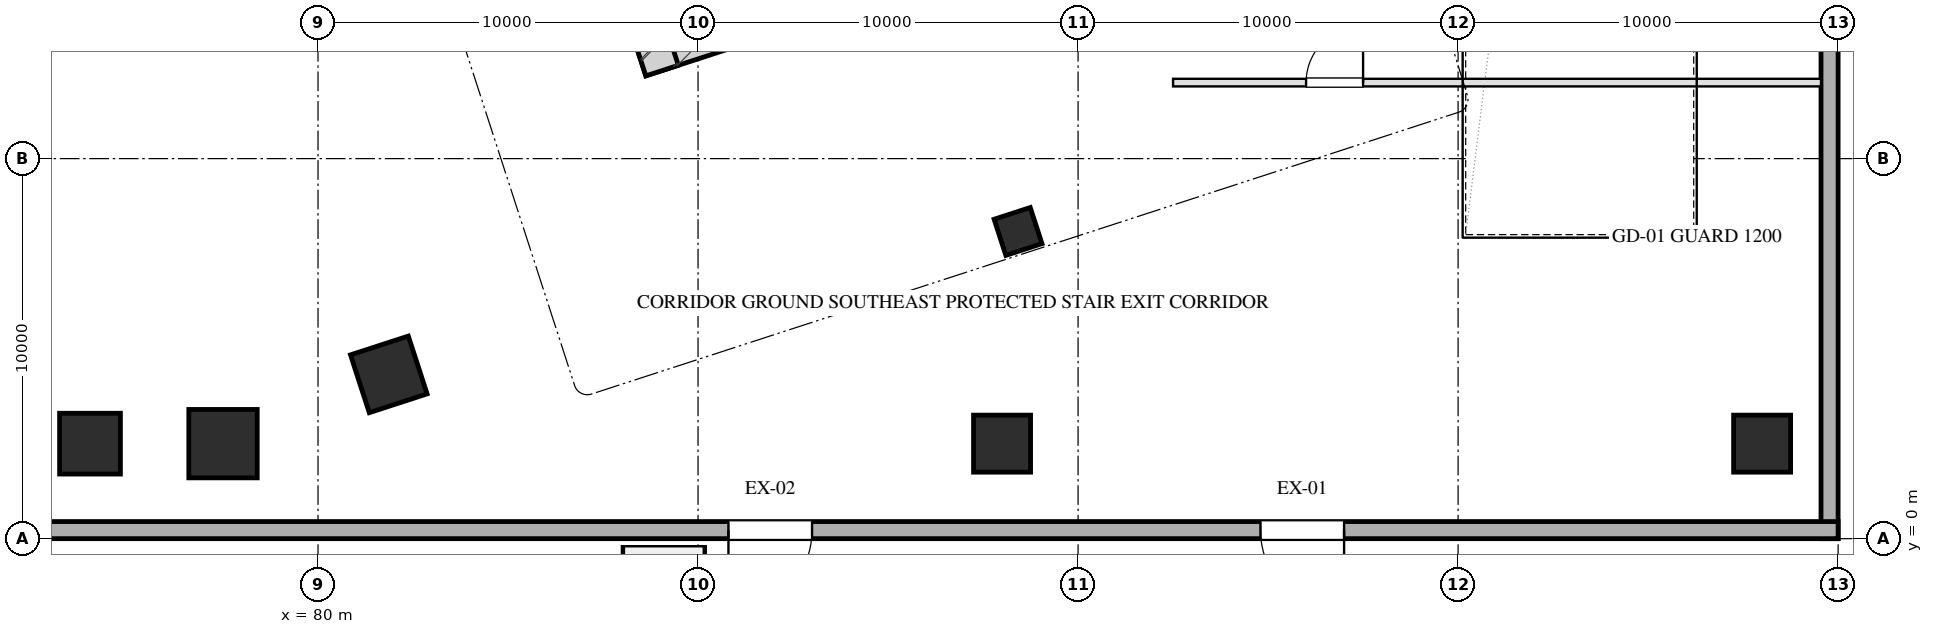
"""IFC4 building model, lengths in metres.
Left out: names, types, materials, properties, quantities, classifications, styles, units other than length and angle.
Written with IfcOpenShell. Run it as: python <this file> out.ifc"""

import sys

from ifc_helpers import new_model, si_unit, direction, frame, frame_2d, origin, origin_2d, place, context, subcontext, project, spatial, rectangle, hollow_rectangle, extrude, element, fill, save


model = new_model("IFC4")
c1 = context("Model", 3, precision=1e-05, world=origin(), true_north=direction((0.0, 1.0)))
c2 = subcontext(c1, "Body", "Model", "MODEL_VIEW")
j1 = project(units=[si_unit("LENGTHUNIT", "METRE"), si_unit("PLANEANGLEUNIT", "RADIAN")], contexts=[c1])
p1 = place(None, origin())
s1 = spatial("IfcSite", under=j1, at=p1, CompositionType="ELEMENT")
p2 = place(p1, origin())
s2 = spatial("IfcBuilding", under=s1, at=p2, CompositionType="ELEMENT")
p3 = place(p2, origin())
s3 = spatial("IfcBuildingStorey", under=s2, at=p3, CompositionType="ELEMENT", Elevation=0.0)
p4 = place(p3, frame((88.487, 12.605, 0.0), z_axis=(0.0, 0.0, 1.0), x_axis=(0.951055016115, 0.309021611416, 0.0)))
e1 = element("IfcWall", 1, at=p4, inside=s3, PredefinedType="SHEAR", context=c2, shape_type="SweptSolid", body=[
    extrude(rectangle(XDim=16.7, YDim=0.9, at=frame_2d((8.35, 0.0))), origin(), (0.0, 0.0, 1.0), 6.0),
])
p5 = place(p3, frame((86.032, 21.618, 0.0), z_axis=(0.0, 0.0, 1.0), x_axis=(0.30901438634, -0.951057363693, 0.0)))
e2 = element("IfcWall", 2, at=p5, inside=s3, PredefinedType="SHEAR", context=c2, shape_type="SweptSolid", body=[
    extrude(rectangle(XDim=9.78, YDim=0.9, at=frame_2d((4.89, 0.0))), origin(), (0.0, 0.0, 1.0), 6.0),
])
p6 = place(p3, frame((77.5, 2.5, 0.0), z_axis=(0.0, 0.0, 1.0), x_axis=(1.0, 0.0, 0.0)))
e3 = element("IfcColumn", 3, at=p6, inside=s3, PredefinedType="COLUMN", context=c2, shape_type="SweptSolid", body=[
    extrude(hollow_rectangle(XDim=1.8, YDim=1.8, WallThickness=0.06, at=origin_2d()), origin(), (0.0, 0.0, 1.0), 6.001),
])
for number, where, z_axis, x_axis in (
    (4, (98.0, 2.5, 0.0), (0.0, 0.0, 1.0), (1.0, 0.0, 0.0)),
    (5, (118.0, 2.5, 0.0), (0.0, 0.0, 1.0), (1.0, 0.0, 0.0)),
):
    element("IfcColumn", number, at=place(p3, frame(where, z_axis=z_axis, x_axis=x_axis)), inside=s3, PredefinedType="COLUMN", context=c2, shape_type="SweptSolid", body=[
        extrude(rectangle(XDim=1.5, YDim=1.5, at=origin_2d()), origin(), (0.0, 0.0, 1.0), 6.001),
    ])
for number, where, z_axis, x_axis in (
    (6, (74.0, 2.5, 0.0), (0.0, 0.0, 1.0), (1.0, 0.0, 0.0)),
    (7, (81.863, 4.323, 0.0), (0.0, 0.0, 1.0), (0.951, 0.309, 0.0)),
):
    element("IfcColumn", number, at=place(p3, frame(where, z_axis=z_axis, x_axis=x_axis)), inside=s3, PredefinedType="COLUMN", context=c2, shape_type="SweptSolid", body=[
        extrude(hollow_rectangle(XDim=1.6, YDim=1.6, WallThickness=0.055, at=origin_2d()), origin(), (0.0, 0.0, 1.0), 6.001),
    ])
p7 = place(p3, frame((98.421, 8.084, 0.0), z_axis=(0.0, 0.0, 1.0), x_axis=(0.951056516295, 0.309016994375, 0.0)))
e8 = element("IfcColumn", 8, at=p7, inside=s3, PredefinedType="COLUMN", context=c2, shape_type="SweptSolid", body=[
    extrude(hollow_rectangle(XDim=1.0, YDim=1.0, WallThickness=0.036, at=origin_2d()), origin(), (0.0, 0.0, 1.0), 6.001),
])
p8 = place(p3, frame((119.775, 68.0, 0.0), z_axis=(0.0, 0.0, 1.0), x_axis=(0.0, -1.0, 0.0)))
e9 = element("IfcWall", 9, at=p8, inside=s3, PredefinedType="SOLIDWALL", context=c2, shape_type="SweptSolid", body=[
    extrude(rectangle(XDim=68.0, YDim=0.45, at=frame_2d((34.0, 0.0))), origin(), (0.0, 0.0, 1.0), 5.7),
])
p9 = place(p8, frame((37.0, 0.0, 0.0)))
e10 = element("IfcOpeningElement", 10, at=p9, cuts=e9, PredefinedType="OPENING", context=c2, shape_type="SweptSolid", body=[
    extrude(rectangle(XDim=2.2, YDim=2.4, at=frame_2d((1.1, 1.2))), frame((0.0, 0.235, 0.0), z_axis=(0.0, -1.0, 0.0), x_axis=(1.0, 0.0, 0.0)), (0.0, 0.0, 1.0), 0.47),
])
p10 = place(p8, frame((5.8, 0.0, 0.0)))
e11 = element("IfcOpeningElement", 11, at=p10, cuts=e9, PredefinedType="OPENING", context=c2, shape_type="SweptSolid", body=[
    extrude(rectangle(XDim=4.2, YDim=2.5, at=frame_2d((2.1, 1.25))), frame((0.0, 0.235, 0.0), z_axis=(0.0, -1.0, 0.0), x_axis=(1.0, 0.0, 0.0)), (0.0, 0.0, 1.0), 0.47),
])
p11 = place(p3, frame((120.0, 0.225, 0.0), z_axis=(0.0, 0.0, 1.0), x_axis=(-1.0, 0.0, 0.0)))
e12 = element("IfcWall", 12, at=p11, inside=s3, PredefinedType="SOLIDWALL", context=c2, shape_type="SweptSolid", body=[
    extrude(rectangle(XDim=120.0, YDim=0.45, at=frame_2d((60.0, 0.0))), origin(), (0.0, 0.0, 1.0), 5.7),
])
p12 = place(p11, frame((13.0, 0.0, 0.0)))
e13 = element("IfcOpeningElement", 13, at=p12, cuts=e12, PredefinedType="OPENING", context=c2, shape_type="SweptSolid", body=[
    extrude(rectangle(XDim=2.2, YDim=2.4, at=frame_2d((1.1, 1.2))), frame((0.0, 0.235, 0.0), z_axis=(0.0, -1.0, 0.0), x_axis=(1.0, 0.0, 0.0)), (0.0, 0.0, 1.0), 0.47),
])
p13 = place(p11, frame((27.0, 0.0, 0.0)))
e14 = element("IfcOpeningElement", 14, at=p13, cuts=e12, PredefinedType="OPENING", context=c2, shape_type="SweptSolid", body=[
    extrude(rectangle(XDim=2.2, YDim=2.4, at=frame_2d((1.1, 1.2))), frame((0.0, 0.235, 0.0), z_axis=(0.0, -1.0, 0.0), x_axis=(1.0, 0.0, 0.0)), (0.0, 0.0, 1.0), 0.47),
])
p14 = place(p11, frame((51.0, 0.0, 0.0)))
e15 = element("IfcOpeningElement", 15, at=p14, cuts=e12, PredefinedType="OPENING", context=c2, shape_type="SweptSolid", body=[
    extrude(rectangle(XDim=2.2, YDim=2.4, at=frame_2d((1.1, 1.2))), frame((0.0, 0.235, 0.0), z_axis=(0.0, -1.0, 0.0), x_axis=(1.0, 0.0, 0.0)), (0.0, 0.0, 1.0), 0.47),
])
p15 = place(p11, frame((59.0, 0.0, 0.0)))
e16 = element("IfcOpeningElement", 16, at=p15, cuts=e12, PredefinedType="OPENING", context=c2, shape_type="SweptSolid", body=[
    extrude(rectangle(XDim=2.2, YDim=2.4, at=frame_2d((1.1, 1.2))), frame((0.0, 0.235, 0.0), z_axis=(0.0, -1.0, 0.0), x_axis=(1.0, 0.0, 0.0)), (0.0, 0.0, 1.0), 0.47),
])
p16 = place(p11, frame((67.0, 0.0, 0.0)))
e17 = element("IfcOpeningElement", 17, at=p16, cuts=e12, PredefinedType="OPENING", context=c2, shape_type="SweptSolid", body=[
    extrude(rectangle(XDim=2.2, YDim=2.4, at=frame_2d((1.1, 1.2))), frame((0.0, 0.235, 0.0), z_axis=(0.0, -1.0, 0.0), x_axis=(1.0, 0.0, 0.0)), (0.0, 0.0, 1.0), 0.47),
])
p17 = place(p11, frame((86.0, 0.0, 0.0)))
e18 = element("IfcOpeningElement", 18, at=p17, cuts=e12, PredefinedType="OPENING", context=c2, shape_type="SweptSolid", body=[
    extrude(rectangle(XDim=2.2, YDim=2.4, at=frame_2d((1.1, 1.2))), frame((0.0, 0.235, 0.0), z_axis=(0.0, -1.0, 0.0), x_axis=(1.0, 0.0, 0.0)), (0.0, 0.0, 1.0), 0.47),
])
p18 = place(p11, frame((104.0, 0.0, 0.0)))
e19 = element("IfcOpeningElement", 19, at=p18, cuts=e12, PredefinedType="OPENING", context=c2, shape_type="SweptSolid", body=[
    extrude(rectangle(XDim=2.2, YDim=2.4, at=frame_2d((1.1, 1.2))), frame((0.0, 0.235, 0.0), z_axis=(0.0, -1.0, 0.0), x_axis=(1.0, 0.0, 0.0)), (0.0, 0.0, 1.0), 0.47),
])
p19 = place(p3, frame((102.5, 12.0, 0.0), z_axis=(0.0, 0.0, 1.0), x_axis=(1.0, 0.0, 0.0)))
e20 = element("IfcWall", 20, at=p19, inside=s3, PredefinedType="PARTITIONING", context=c2, shape_type="SweptSolid", body=[
    extrude(rectangle(XDim=17.05, YDim=0.2, at=frame_2d((8.525, 0.0))), origin(), (0.0, 0.0, 1.0), 5.685),
])
p20 = place(p19, frame((3.5, 0.0, 0.0)))
e21 = element("IfcOpeningElement", 21, at=p20, cuts=e20, PredefinedType="OPENING", context=c2, shape_type="SweptSolid", body=[
    extrude(rectangle(XDim=1.5, YDim=2.05, at=frame_2d((0.75, 1.025))), frame((0.0, 0.11, 0.0), z_axis=(0.0, -1.0, 0.0), x_axis=(1.0, 0.0, 0.0)), (0.0, 0.0, 1.0), 0.22),
])
p21 = place(p12, origin())
e22 = element("IfcDoor", 22, at=p21, inside=s3, OperationType="SINGLE_SWING_LEFT", PredefinedType="DOOR", context=c2, shape_type="SweptSolid", body=[
    extrude(rectangle(XDim=2.2, YDim=2.4, at=frame_2d((1.1, 1.2))), frame((0.0, 0.025, 0.0), z_axis=(0.0, -1.0, 0.0), x_axis=(1.0, 0.0, 0.0)), (0.0, 0.0, 1.0), 0.05),
])
fill(e13, e22)
p22 = place(p13, origin())
e23 = element("IfcDoor", 23, at=p22, inside=s3, OperationType="SINGLE_SWING_RIGHT", PredefinedType="DOOR", context=c2, shape_type="SweptSolid", body=[
    extrude(rectangle(XDim=2.2, YDim=2.4, at=frame_2d((1.1, 1.2))), frame((0.0, 0.025, 0.0), z_axis=(0.0, -1.0, 0.0), x_axis=(1.0, 0.0, 0.0)), (0.0, 0.0, 1.0), 0.05),
])
fill(e14, e23)
p23 = place(p20, origin())
e24 = element("IfcDoor", 24, at=p23, inside=s3, OperationType="SINGLE_SWING_RIGHT", PredefinedType="DOOR", context=c2, shape_type="SweptSolid", body=[
    extrude(rectangle(XDim=1.5, YDim=2.05, at=frame_2d((0.75, 1.025))), frame((0.0, 0.025, 0.0), z_axis=(0.0, -1.0, 0.0), x_axis=(1.0, 0.0, 0.0)), (0.0, 0.0, 1.0), 0.05),
])
fill(e21, e24)
save(model, sys.argv[1])
